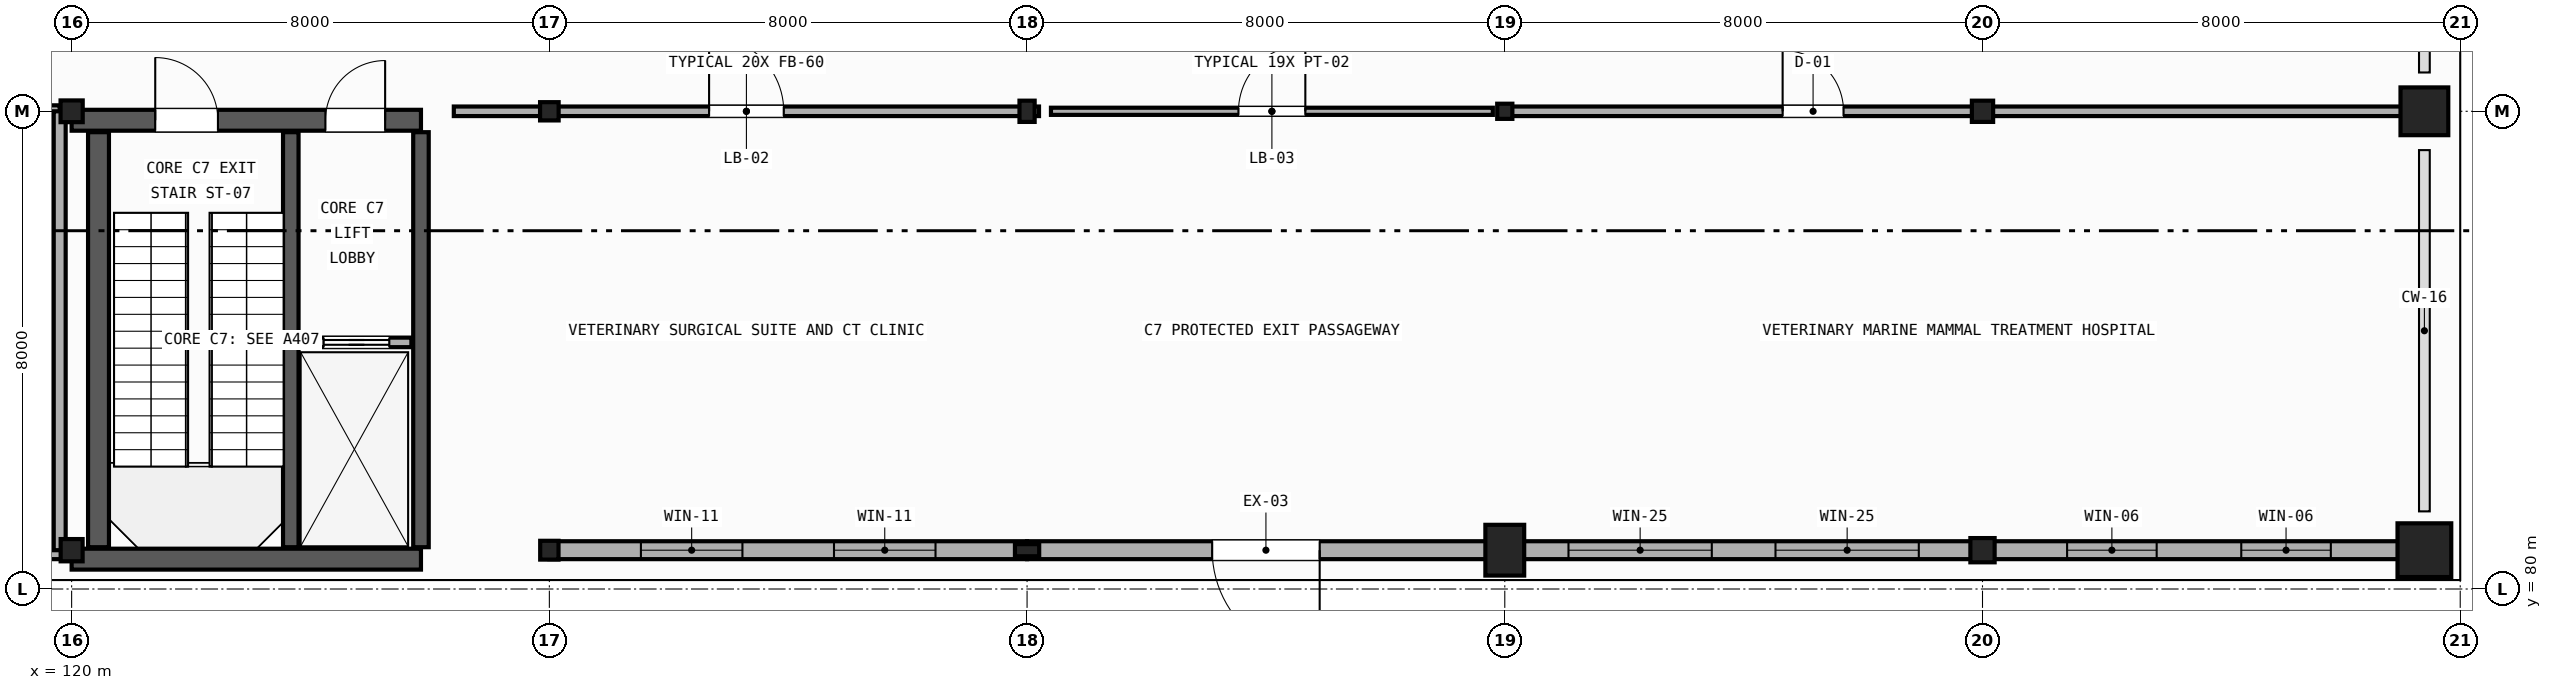
"""IFC4 building model, lengths in metres.
Left out: names, types, materials, properties, quantities, classifications, styles, units other than length and angle.
Written with IfcOpenShell. Run it as: python <this file> out.ifc"""

import sys

from ifc_helpers import new_model, si_unit, direction, frame, frame_2d, origin, origin_2d, place, context, subcontext, project, spatial, rectangle, hollow_rectangle, hollow_circle, i_section, extrude, element, fill, save


model = new_model("IFC4")
c1 = context("Model", 3, precision=1e-05, world=origin(), true_north=direction((0.0, 1.0)))
c2 = subcontext(c1, "Body", "Model", "MODEL_VIEW")
j1 = project(units=[si_unit("LENGTHUNIT", "METRE"), si_unit("PLANEANGLEUNIT", "RADIAN")], contexts=[c1])
p1 = place(None, origin())
s1 = spatial("IfcSite", under=j1, at=p1, CompositionType="ELEMENT")
p2 = place(p1, origin())
s2 = spatial("IfcBuilding", under=s1, at=p2, CompositionType="ELEMENT")
p3 = place(p2, origin())
s3 = spatial("IfcBuildingStorey", under=s2, at=p3, CompositionType="ELEMENT", Elevation=0.0)
p4 = place(p3, frame((120.0, 80.65, 0.0), z_axis=(0.0, 0.0, 1.0), x_axis=(0.0, 1.0, 0.0)))
e1 = element("IfcColumn", 1, at=p4, inside=s3, PredefinedType="COLUMN", context=c2, shape_type="SweptSolid", body=[
    extrude(i_section(OverallWidth=0.373, OverallDepth=0.368, WebThickness=0.015, FlangeThickness=0.024, FilletRadius=0.015, at=origin_2d()), origin(), (0.0, 0.0, 1.0), 5.12),
])
p5 = place(p3, frame((120.0, 88.0, 0.0), z_axis=(0.0, 0.0, 1.0), x_axis=(1.0, 0.0, 0.0)))
e2 = element("IfcColumn", 2, at=p5, inside=s3, PredefinedType="COLUMN", context=c2, shape_type="SweptSolid", body=[
    extrude(i_section(OverallWidth=0.371, OverallDepth=0.364, WebThickness=0.013, FlangeThickness=0.022, FilletRadius=0.015, at=origin_2d()), origin(), (0.0, 0.0, 1.0), 5.12),
])
p6 = place(p3, frame((128.0, 80.65, 0.0), z_axis=(0.0, 0.0, 1.0), x_axis=(1.0, 0.0, 0.0)))
e3 = element("IfcColumn", 3, at=p6, inside=s3, PredefinedType="COLUMN", context=c2, shape_type="SweptSolid", body=[
    extrude(i_section(OverallWidth=0.307, OverallDepth=0.315, WebThickness=0.012, FlangeThickness=0.019, FilletRadius=0.013, at=origin_2d()), origin(), (0.0, 0.0, 1.0), 5.12),
])
p7 = place(p3, frame((128.0, 88.0, 0.0), z_axis=(0.0, 0.0, 1.0), x_axis=(0.0, 1.0, 0.0)))
e4 = element("IfcColumn", 4, at=p7, inside=s3, PredefinedType="COLUMN", context=c2, shape_type="SweptSolid", body=[
    extrude(i_section(OverallWidth=0.306, OverallDepth=0.311, WebThickness=0.011, FlangeThickness=0.017, FilletRadius=0.013, at=origin_2d()), origin(), (0.0, 0.0, 1.0), 5.12),
])
p8 = place(p3, frame((136.0, 80.65, 0.0), z_axis=(0.0, 0.0, 1.0), x_axis=(0.0, 1.0, 0.0)))
e5 = element("IfcColumn", 5, at=p8, inside=s3, PredefinedType="COLUMN", context=c2, shape_type="SweptSolid", body=[
    extrude(hollow_rectangle(XDim=0.203, YDim=0.406, WallThickness=0.012, InnerFilletRadius=0.012, OuterFilletRadius=0.024, at=origin_2d()), origin(), (0.0, 0.0, 1.0), 5.12),
])
p9 = place(p3, frame((136.0, 88.0, 0.0), z_axis=(0.0, 0.0, 1.0), x_axis=(1.0, 0.0, 0.0)))
e6 = element("IfcColumn", 6, at=p9, inside=s3, PredefinedType="COLUMN", context=c2, shape_type="SweptSolid", body=[
    extrude(hollow_rectangle(XDim=0.254, YDim=0.356, WallThickness=0.012, InnerFilletRadius=0.012, OuterFilletRadius=0.024, at=origin_2d()), origin(), (0.0, 0.0, 1.0), 5.12),
])
p10 = place(p3, frame((144.0, 80.65, 0.0), z_axis=(0.0, 0.0, 1.0), x_axis=(1.0, 0.0, 0.0)))
e7 = element("IfcColumn", 7, at=p10, inside=s3, PredefinedType="PILASTER", context=c2, shape_type="SweptSolid", body=[
    extrude(rectangle(XDim=0.65, YDim=0.85, at=origin_2d()), origin(), (0.0, 0.0, 1.0), 5.12),
])
p11 = place(p3, frame((144.0, 88.0, 0.0), z_axis=(0.0, 0.0, 1.0), x_axis=(0.0, 1.0, 0.0)))
e8 = element("IfcColumn", 8, at=p11, inside=s3, PredefinedType="COLUMN", context=c2, shape_type="SweptSolid", body=[
    extrude(hollow_rectangle(XDim=0.254, YDim=0.254, WallThickness=0.012, InnerFilletRadius=0.012, OuterFilletRadius=0.024, at=origin_2d()), origin(), (0.0, 0.0, 1.0), 5.12),
])
p12 = place(p3, frame((152.0, 80.65, 0.0), z_axis=(0.0, 0.0, 1.0), x_axis=(0.0, 1.0, 0.0)))
e9 = element("IfcColumn", 9, at=p12, inside=s3, PredefinedType="COLUMN", context=c2, shape_type="SweptSolid", body=[
    extrude(hollow_circle(Radius=0.203, WallThickness=0.012, at=origin_2d()), origin(), (0.0, 0.0, 1.0), 5.12),
])
p13 = place(p3, frame((152.0, 88.0, 0.0), z_axis=(0.0, 0.0, 1.0), x_axis=(1.0, 0.0, 0.0)))
e10 = element("IfcColumn", 10, at=p13, inside=s3, PredefinedType="COLUMN", context=c2, shape_type="SweptSolid", body=[
    extrude(hollow_circle(Radius=0.178, WallThickness=0.012, at=origin_2d()), origin(), (0.0, 0.0, 1.0), 5.12),
])
p14 = place(p3, frame((159.4, 80.65, 0.0), z_axis=(0.0, 0.0, 1.0), x_axis=(1.0, 0.0, 0.0)))
e11 = element("IfcColumn", 11, at=p14, inside=s3, PredefinedType="COLUMN", context=c2, shape_type="SweptSolid", body=[
    extrude(rectangle(XDim=0.9, YDim=0.9, at=origin_2d()), origin(), (0.0, 0.0, 1.0), 5.12),
])
p15 = place(p3, frame((159.4, 88.0, 0.0), z_axis=(0.0, 0.0, 1.0), x_axis=(0.0, 1.0, 0.0)))
e12 = element("IfcColumn", 12, at=p15, inside=s3, PredefinedType="COLUMN", context=c2, shape_type="SweptSolid", body=[
    extrude(rectangle(XDim=0.8, YDim=0.8, at=origin_2d()), origin(), (0.0, 0.0, 1.0), 5.12),
])
p16 = place(p3, frame((112.65, 80.65, 0.0), z_axis=(0.0, 0.0, 1.0), x_axis=(1.0, 0.0, 0.0)))
e13 = element("IfcWall", 13, at=p16, inside=s3, PredefinedType="STANDARD", context=c2, shape_type="SweptSolid", body=[
    extrude(rectangle(XDim=7.35, YDim=0.3, at=frame_2d((3.675, 0.0))), origin(), (0.0, 0.0, 1.0), 4.468),
])
p17 = place(p16, frame((1.117, 0.0, 0.9)))
e14 = element("IfcOpeningElement", 14, at=p17, cuts=e13, PredefinedType="OPENING", context=c2, shape_type="SweptSolid", body=[
    extrude(rectangle(XDim=2.0, YDim=2.6, at=frame_2d((1.0, 1.3))), frame((0.0, 0.16, 0.0), z_axis=(0.0, -1.0, 0.0), x_axis=(1.0, 0.0, 0.0)), (0.0, 0.0, 1.0), 0.32),
])
p18 = place(p16, frame((4.233, 0.0, 0.9)))
e15 = element("IfcOpeningElement", 15, at=p18, cuts=e13, PredefinedType="OPENING", context=c2, shape_type="SweptSolid", body=[
    extrude(rectangle(XDim=2.0, YDim=2.6, at=frame_2d((1.0, 1.3))), frame((0.0, 0.16, 0.0), z_axis=(0.0, -1.0, 0.0), x_axis=(1.0, 0.0, 0.0)), (0.0, 0.0, 1.0), 0.32),
])
p19 = place(p3, frame((128.0, 80.65, 0.0), z_axis=(0.0, 0.0, 1.0), x_axis=(1.0, 0.0, 0.0)))
e16 = element("IfcWall", 16, at=p19, inside=s3, PredefinedType="STANDARD", context=c2, shape_type="SweptSolid", body=[
    extrude(rectangle(XDim=8.0, YDim=0.3, at=frame_2d((4.0, 0.0))), origin(), (0.0, 0.0, 1.0), 4.28),
])
p20 = place(p19, frame((1.533, 0.0, 1.05)))
e17 = element("IfcOpeningElement", 17, at=p20, cuts=e16, PredefinedType="OPENING", context=c2, shape_type="SweptSolid", body=[
    extrude(rectangle(XDim=1.7, YDim=1.8, at=frame_2d((0.85, 0.9))), frame((0.0, 0.16, 0.0), z_axis=(0.0, -1.0, 0.0), x_axis=(1.0, 0.0, 0.0)), (0.0, 0.0, 1.0), 0.32),
])
p21 = place(p19, frame((4.767, 0.0, 1.05)))
e18 = element("IfcOpeningElement", 18, at=p21, cuts=e16, PredefinedType="OPENING", context=c2, shape_type="SweptSolid", body=[
    extrude(rectangle(XDim=1.7, YDim=1.8, at=frame_2d((0.85, 0.9))), frame((0.0, 0.16, 0.0), z_axis=(0.0, -1.0, 0.0), x_axis=(1.0, 0.0, 0.0)), (0.0, 0.0, 1.0), 0.32),
])
p22 = place(p3, frame((144.0, 80.65, 0.0), z_axis=(0.0, 0.0, 1.0), x_axis=(-1.0, 0.0, 0.0)))
e19 = element("IfcWall", 19, at=p22, inside=s3, PredefinedType="STANDARD", context=c2, shape_type="SweptSolid", body=[
    extrude(rectangle(XDim=8.0, YDim=0.3, at=frame_2d((4.0, 0.0))), origin(), (0.0, 0.0, 1.0), 4.28),
])
p23 = place(p22, frame((3.1, 0.0, 0.0)))
e20 = element("IfcOpeningElement", 20, at=p23, cuts=e19, PredefinedType="OPENING", context=c2, shape_type="SweptSolid", body=[
    extrude(rectangle(XDim=1.8, YDim=2.35, at=frame_2d((0.9, 1.175))), frame((0.0, 0.16, 0.0), z_axis=(0.0, -1.0, 0.0), x_axis=(1.0, 0.0, 0.0)), (0.0, 0.0, 1.0), 0.32),
])
p24 = place(p3, frame((144.0, 80.65, 0.0), z_axis=(0.0, 0.0, 1.0), x_axis=(1.0, 0.0, 0.0)))
e21 = element("IfcWall", 21, at=p24, inside=s3, PredefinedType="STANDARD", context=c2, shape_type="SweptSolid", body=[
    extrude(rectangle(XDim=8.0, YDim=0.3, at=frame_2d((4.0, 0.0))), origin(), (0.0, 0.0, 1.0), 4.28),
])
p25 = place(p24, frame((1.067, 0.0, 1.0)))
e22 = element("IfcOpeningElement", 22, at=p25, cuts=e21, PredefinedType="OPENING", context=c2, shape_type="SweptSolid", body=[
    extrude(rectangle(XDim=2.4, YDim=2.05, at=frame_2d((1.2, 1.025))), frame((0.0, 0.16, 0.0), z_axis=(0.0, -1.0, 0.0), x_axis=(1.0, 0.0, 0.0)), (0.0, 0.0, 1.0), 0.32),
])
p26 = place(p24, frame((4.533, 0.0, 1.0)))
e23 = element("IfcOpeningElement", 23, at=p26, cuts=e21, PredefinedType="OPENING", context=c2, shape_type="SweptSolid", body=[
    extrude(rectangle(XDim=2.4, YDim=2.05, at=frame_2d((1.2, 1.025))), frame((0.0, 0.16, 0.0), z_axis=(0.0, -1.0, 0.0), x_axis=(1.0, 0.0, 0.0)), (0.0, 0.0, 1.0), 0.32),
])
p27 = place(p3, frame((152.0, 80.65, 0.0), z_axis=(0.0, 0.0, 1.0), x_axis=(1.0, 0.0, 0.0)))
e24 = element("IfcWall", 24, at=p27, inside=s3, PredefinedType="STANDARD", context=c2, shape_type="SweptSolid", body=[
    extrude(rectangle(XDim=7.25, YDim=0.3, at=frame_2d((3.625, 0.0))), origin(), (0.0, 0.0, 1.0), 4.318),
])
p28 = place(p27, frame((1.417, 0.0, 0.95)))
e25 = element("IfcOpeningElement", 25, at=p28, cuts=e24, PredefinedType="OPENING", context=c2, shape_type="SweptSolid", body=[
    extrude(rectangle(XDim=1.5, YDim=2.2, at=frame_2d((0.75, 1.1))), frame((0.0, 0.16, 0.0), z_axis=(0.0, -1.0, 0.0), x_axis=(1.0, 0.0, 0.0)), (0.0, 0.0, 1.0), 0.32),
])
p29 = place(p27, frame((4.333, 0.0, 0.95)))
e26 = element("IfcOpeningElement", 26, at=p29, cuts=e24, PredefinedType="OPENING", context=c2, shape_type="SweptSolid", body=[
    extrude(rectangle(XDim=1.5, YDim=2.2, at=frame_2d((0.75, 1.1))), frame((0.0, 0.16, 0.0), z_axis=(0.0, -1.0, 0.0), x_axis=(1.0, 0.0, 0.0)), (0.0, 0.0, 1.0), 0.32),
])
p30 = place(p3, frame((120.0, 87.85, 0.0), z_axis=(0.0, 0.0, 1.0), x_axis=(1.0, 0.0, 0.0)))
e27 = element("IfcWall", 27, at=p30, inside=s3, PredefinedType="SHEAR", context=c2, shape_type="SweptSolid", body=[
    extrude(rectangle(XDim=5.85, YDim=0.35, at=frame_2d((2.925, 0.0))), origin(), (0.0, 0.0, 1.0), 5.11),
])
p31 = place(p30, frame((1.4, 0.0, 0.0)))
e28 = element("IfcOpeningElement", 28, at=p31, cuts=e27, PredefinedType="OPENING", context=c2, shape_type="SweptSolid", body=[
    extrude(rectangle(XDim=1.05, YDim=2.1, at=frame_2d((0.525, 1.05))), frame((0.0, 0.185, 0.0), z_axis=(0.0, -1.0, 0.0), x_axis=(1.0, 0.0, 0.0)), (0.0, 0.0, 1.0), 0.37),
])
p32 = place(p30, frame((4.25, 0.0, 0.0)))
e29 = element("IfcOpeningElement", 29, at=p32, cuts=e27, PredefinedType="OPENING", context=c2, shape_type="SweptSolid", body=[
    extrude(rectangle(XDim=1.0, YDim=2.15, at=frame_2d((0.5, 1.075))), frame((0.0, 0.185, 0.0), z_axis=(0.0, -1.0, 0.0), x_axis=(1.0, 0.0, 0.0)), (0.0, 0.0, 1.0), 0.37),
])
p33 = place(p3, frame((120.0, 80.5, 0.0), z_axis=(0.0, 0.0, 1.0), x_axis=(1.0, 0.0, 0.0)))
e30 = element("IfcWall", 30, at=p33, inside=s3, PredefinedType="SHEAR", context=c2, shape_type="SweptSolid", body=[
    extrude(rectangle(XDim=5.85, YDim=0.35, at=frame_2d((2.925, 0.0))), origin(), (0.0, 0.0, 1.0), 5.11),
])
p34 = place(p3, frame((120.45, 80.7, 0.0), z_axis=(0.0, 0.0, 1.0), x_axis=(0.0, 1.0, 0.0)))
e31 = element("IfcWall", 31, at=p34, inside=s3, PredefinedType="SHEAR", context=c2, shape_type="SweptSolid", body=[
    extrude(rectangle(XDim=6.95, YDim=0.35, at=frame_2d((3.475, 0.0))), origin(), (0.0, 0.0, 1.0), 5.11),
])
for number, where, z_axis, x_axis in (
    (32, (125.85, 80.7, 0.0), (0.0, 0.0, 1.0), (0.0, 1.0, 0.0)),
    (33, (123.67, 80.7, 0.0), (0.0, 0.0, 1.0), (0.0, 1.0, 0.0)),
):
    element("IfcWall", number, at=place(p3, frame(where, z_axis=z_axis, x_axis=x_axis)), inside=s3, PredefinedType="SHEAR", context=c2, shape_type="SweptSolid", body=[
        extrude(rectangle(XDim=6.95, YDim=0.26, at=frame_2d((3.475, 0.0))), origin(), (0.0, 0.0, 1.0), 5.11),
    ])
p35 = place(p3, frame((123.85, 84.13, 0.0), z_axis=(0.0, 0.0, 1.0), x_axis=(1.0, 0.0, 0.0)))
e34 = element("IfcWall", 34, at=p35, inside=s3, PredefinedType="PARTITIONING", context=c2, shape_type="SweptSolid", body=[
    extrude(rectangle(XDim=1.84, YDim=0.16, at=frame_2d((0.92, 0.0))), origin(), (0.0, 0.0, 1.0), 3.6),
])
p36 = place(p35, frame((0.37, 0.0, 0.0)))
e35 = element("IfcOpeningElement", 35, at=p36, cuts=e34, PredefinedType="OPENING", context=c2, shape_type="SweptSolid", body=[
    extrude(rectangle(XDim=1.1, YDim=2.15, at=frame_2d((0.55, 1.075))), frame((0.0, 0.09, 0.0), z_axis=(0.0, -1.0, 0.0), x_axis=(1.0, 0.0, 0.0)), (0.0, 0.0, 1.0), 0.18),
])
p37 = place(p3, frame((113.0, 88.0, 0.0), z_axis=(0.0, 0.0, 1.0), x_axis=(1.0, 0.0, 0.0)))
e36 = element("IfcWall", 36, at=p37, inside=s3, PredefinedType="PLUMBINGWALL", context=c2, shape_type="SweptSolid", body=[
    extrude(rectangle(XDim=6.8, YDim=0.2, at=frame_2d((3.4, 0.0))), origin(), (0.0, 0.0, 1.0), 4.29),
])
p38 = place(p37, frame((2.945, 0.0, 0.0)))
e37 = element("IfcOpeningElement", 37, at=p38, cuts=e36, PredefinedType="OPENING", context=c2, shape_type="SweptSolid", body=[
    extrude(rectangle(XDim=0.91, YDim=2.1, at=frame_2d((0.455, 1.05))), frame((0.0, 0.11, 0.0), z_axis=(0.0, -1.0, 0.0), x_axis=(1.0, 0.0, 0.0)), (0.0, 0.0, 1.0), 0.22),
])
p39 = place(p3, frame((119.8, 80.65, 0.0), z_axis=(0.0, 0.0, 1.0), x_axis=(0.0, 1.0, 0.0)))
e38 = element("IfcWall", 38, at=p39, inside=s3, PredefinedType="PLUMBINGWALL", context=c2, shape_type="SweptSolid", body=[
    extrude(rectangle(XDim=7.35, YDim=0.2, at=frame_2d((3.675, 0.0))), origin(), (0.0, 0.0, 1.0), 4.29),
])
p40 = place(p3, frame((126.4, 88.0, 0.0), z_axis=(0.0, 0.0, 1.0), x_axis=(1.0, 0.0, 0.0)))
e39 = element("IfcWall", 39, at=p40, inside=s3, PredefinedType="PARTITIONING", context=c2, shape_type="SweptSolid", body=[
    extrude(rectangle(XDim=9.8, YDim=0.16, at=frame_2d((4.9, 0.0))), origin(), (0.0, 0.0, 1.0), 4.29),
])
p41 = place(p40, frame((4.275, 0.0, 0.0)))
e40 = element("IfcOpeningElement", 40, at=p41, cuts=e39, PredefinedType="OPENING", context=c2, shape_type="SweptSolid", body=[
    extrude(rectangle(XDim=1.25, YDim=2.2, at=frame_2d((0.625, 1.1))), frame((0.0, 0.09, 0.0), z_axis=(0.0, -1.0, 0.0), x_axis=(1.0, 0.0, 0.0)), (0.0, 0.0, 1.0), 0.18),
])
p42 = place(p3, frame((136.4, 88.0, 0.0), z_axis=(0.0, 0.0, 1.0), x_axis=(1.0, 0.0, 0.0)))
e41 = element("IfcWall", 41, at=p42, inside=s3, PredefinedType="PARTITIONING", context=c2, shape_type="SweptSolid", body=[
    extrude(rectangle(XDim=7.4, YDim=0.12, at=frame_2d((3.7, 0.0))), origin(), (0.0, 0.0, 1.0), 4.29),
])
p43 = place(p42, frame((3.14, 0.0, 0.0)))
e42 = element("IfcOpeningElement", 42, at=p43, cuts=e41, PredefinedType="OPENING", context=c2, shape_type="SweptSolid", body=[
    extrude(rectangle(XDim=1.12, YDim=2.15, at=frame_2d((0.56, 1.075))), frame((0.0, 0.07, 0.0), z_axis=(0.0, -1.0, 0.0), x_axis=(1.0, 0.0, 0.0)), (0.0, 0.0, 1.0), 0.14),
])
p44 = place(p3, frame((144.0, 88.0, 0.0), z_axis=(0.0, 0.0, 1.0), x_axis=(1.0, 0.0, 0.0)))
e43 = element("IfcWall", 43, at=p44, inside=s3, PredefinedType="PARTITIONING", context=c2, shape_type="SweptSolid", body=[
    extrude(rectangle(XDim=15.2, YDim=0.16, at=frame_2d((7.6, 0.0))), origin(), (0.0, 0.0, 1.0), 4.29),
])
p45 = place(p44, frame((4.653, 0.0, 0.0)))
e44 = element("IfcOpeningElement", 44, at=p45, cuts=e43, PredefinedType="OPENING", context=c2, shape_type="SweptSolid", body=[
    extrude(rectangle(XDim=1.02, YDim=2.15, at=frame_2d((0.51, 1.075))), frame((0.0, 0.09, 0.0), z_axis=(0.0, -1.0, 0.0), x_axis=(1.0, 0.0, 0.0)), (0.0, 0.0, 1.0), 0.18),
])
p46 = place(p20, origin())
e45 = element("IfcWindow", 45, at=p46, inside=s3, PartitioningType="SINGLE_PANEL", PredefinedType="WINDOW", context=c2, shape_type="SweptSolid", body=[
    extrude(rectangle(XDim=1.7, YDim=1.8, at=frame_2d((0.85, 0.9))), frame((0.0, 0.03, 0.0), z_axis=(0.0, -1.0, 0.0), x_axis=(1.0, 0.0, 0.0)), (0.0, 0.0, 1.0), 0.06),
])
fill(e17, e45)
p47 = place(p21, origin())
e46 = element("IfcWindow", 46, at=p47, inside=s3, PartitioningType="SINGLE_PANEL", PredefinedType="WINDOW", context=c2, shape_type="SweptSolid", body=[
    extrude(rectangle(XDim=1.7, YDim=1.8, at=frame_2d((0.85, 0.9))), frame((0.0, 0.03, 0.0), z_axis=(0.0, -1.0, 0.0), x_axis=(1.0, 0.0, 0.0)), (0.0, 0.0, 1.0), 0.06),
])
fill(e18, e46)
p48 = place(p23, origin())
e47 = element("IfcDoor", 47, at=p48, inside=s3, OperationType="SINGLE_SWING_LEFT", PredefinedType="DOOR", context=c2, shape_type="SweptSolid", body=[
    extrude(rectangle(XDim=1.8, YDim=2.35, at=frame_2d((0.9, 1.175))), frame((0.0, 0.025, 0.0), z_axis=(0.0, -1.0, 0.0), x_axis=(1.0, 0.0, 0.0)), (0.0, 0.0, 1.0), 0.05),
])
fill(e20, e47)
p49 = place(p25, origin())
e48 = element("IfcWindow", 48, at=p49, inside=s3, PartitioningType="SINGLE_PANEL", PredefinedType="WINDOW", context=c2, shape_type="SweptSolid", body=[
    extrude(rectangle(XDim=2.4, YDim=2.05, at=frame_2d((1.2, 1.025))), frame((0.0, 0.03, 0.0), z_axis=(0.0, -1.0, 0.0), x_axis=(1.0, 0.0, 0.0)), (0.0, 0.0, 1.0), 0.06),
])
fill(e22, e48)
p50 = place(p26, origin())
e49 = element("IfcWindow", 49, at=p50, inside=s3, PartitioningType="SINGLE_PANEL", PredefinedType="WINDOW", context=c2, shape_type="SweptSolid", body=[
    extrude(rectangle(XDim=2.4, YDim=2.05, at=frame_2d((1.2, 1.025))), frame((0.0, 0.03, 0.0), z_axis=(0.0, -1.0, 0.0), x_axis=(1.0, 0.0, 0.0)), (0.0, 0.0, 1.0), 0.06),
])
fill(e23, e49)
p51 = place(p28, origin())
e50 = element("IfcWindow", 50, at=p51, inside=s3, PartitioningType="SINGLE_PANEL", PredefinedType="WINDOW", context=c2, shape_type="SweptSolid", body=[
    extrude(rectangle(XDim=1.5, YDim=2.2, at=frame_2d((0.75, 1.1))), frame((0.0, 0.03, 0.0), z_axis=(0.0, -1.0, 0.0), x_axis=(1.0, 0.0, 0.0)), (0.0, 0.0, 1.0), 0.06),
])
fill(e25, e50)
p52 = place(p29, origin())
e51 = element("IfcWindow", 51, at=p52, inside=s3, PartitioningType="SINGLE_PANEL", PredefinedType="WINDOW", context=c2, shape_type="SweptSolid", body=[
    extrude(rectangle(XDim=1.5, YDim=2.2, at=frame_2d((0.75, 1.1))), frame((0.0, 0.03, 0.0), z_axis=(0.0, -1.0, 0.0), x_axis=(1.0, 0.0, 0.0)), (0.0, 0.0, 1.0), 0.06),
])
fill(e26, e51)
p53 = place(p36, origin())
e52 = element("IfcDoor", 52, at=p53, inside=s3, OperationType="SLIDING_TO_LEFT", PredefinedType="DOOR", context=c2, shape_type="SweptSolid", body=[
    extrude(rectangle(XDim=1.1, YDim=2.15, at=frame_2d((0.55, 1.075))), frame((0.0, 0.025, 0.0), z_axis=(0.0, -1.0, 0.0), x_axis=(1.0, 0.0, 0.0)), (0.0, 0.0, 1.0), 0.05),
])
fill(e35, e52)
p54 = place(p31, origin())
e53 = element("IfcDoor", 53, at=p54, inside=s3, OperationType="SINGLE_SWING_LEFT", PredefinedType="DOOR", context=c2, shape_type="SweptSolid", body=[
    extrude(rectangle(XDim=1.05, YDim=2.1, at=frame_2d((0.525, 1.05))), frame((0.0, 0.025, 0.0), z_axis=(0.0, -1.0, 0.0), x_axis=(1.0, 0.0, 0.0)), (0.0, 0.0, 1.0), 0.05),
])
fill(e28, e53)
p55 = place(p32, origin())
e54 = element("IfcDoor", 54, at=p55, inside=s3, OperationType="SINGLE_SWING_RIGHT", PredefinedType="DOOR", context=c2, shape_type="SweptSolid", body=[
    extrude(rectangle(XDim=1.0, YDim=2.15, at=frame_2d((0.5, 1.075))), frame((0.0, 0.025, 0.0), z_axis=(0.0, -1.0, 0.0), x_axis=(1.0, 0.0, 0.0)), (0.0, 0.0, 1.0), 0.05),
])
fill(e29, e54)
p56 = place(p41, origin())
e55 = element("IfcDoor", 55, at=p56, inside=s3, OperationType="SINGLE_SWING_LEFT", PredefinedType="DOOR", context=c2, shape_type="SweptSolid", body=[
    extrude(rectangle(XDim=1.25, YDim=2.2, at=frame_2d((0.625, 1.1))), frame((0.0, 0.025, 0.0), z_axis=(0.0, -1.0, 0.0), x_axis=(1.0, 0.0, 0.0)), (0.0, 0.0, 1.0), 0.05),
])
fill(e40, e55)
p57 = place(p43, origin())
e56 = element("IfcDoor", 56, at=p57, inside=s3, OperationType="SINGLE_SWING_RIGHT", PredefinedType="DOOR", context=c2, shape_type="SweptSolid", body=[
    extrude(rectangle(XDim=1.12, YDim=2.15, at=frame_2d((0.56, 1.075))), frame((0.0, 0.025, 0.0), z_axis=(0.0, -1.0, 0.0), x_axis=(1.0, 0.0, 0.0)), (0.0, 0.0, 1.0), 0.05),
])
fill(e42, e56)
p58 = place(p45, origin())
e57 = element("IfcDoor", 57, at=p58, inside=s3, OperationType="SINGLE_SWING_LEFT", PredefinedType="DOOR", context=c2, shape_type="SweptSolid", body=[
    extrude(rectangle(XDim=1.02, YDim=2.15, at=frame_2d((0.51, 1.075))), frame((0.0, 0.025, 0.0), z_axis=(0.0, -1.0, 0.0), x_axis=(1.0, 0.0, 0.0)), (0.0, 0.0, 1.0), 0.05),
])
fill(e44, e57)
save(model, sys.argv[1])
